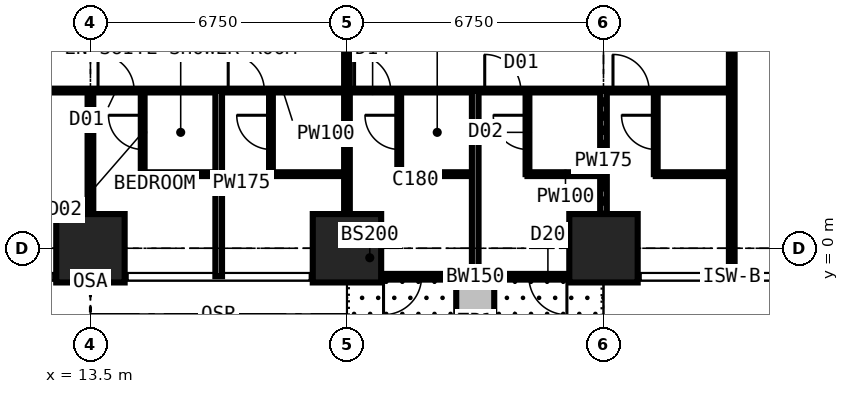
"""IFC4 building model, lengths in metres.
Left out: names, types, materials, properties, quantities, classifications, styles, units other than length and angle.
Written with IfcOpenShell. Run it as: python <this file> out.ifc"""

import sys

from ifc_helpers import new_model, si_unit, direction, frame, frame_2d, origin, origin_2d, place, context, subcontext, project, spatial, rectangle, extrude, element, fill, save


model = new_model("IFC4")
c1 = context("Model", 3, precision=1e-05, world=origin(), true_north=direction((0.0, 1.0)))
c2 = subcontext(c1, "Body", "Model", "MODEL_VIEW")
j1 = project(units=[si_unit("LENGTHUNIT", "METRE"), si_unit("PLANEANGLEUNIT", "RADIAN")], contexts=[c1])
p1 = place(None, origin())
s1 = spatial("IfcSite", under=j1, at=p1, CompositionType="ELEMENT")
p2 = place(p1, origin())
s2 = spatial("IfcBuilding", under=s1, at=p2, CompositionType="ELEMENT")
p3 = place(p2, frame((0.0, 0.0, 90.9)))
s3 = spatial("IfcBuildingStorey", under=s2, at=p3, CompositionType="ELEMENT", Elevation=90.9)
for number, where, z_axis, x_axis in (
    (1, (13.5, 0.0, 0.0), (0.0, 0.0, 1.0), (1.0, 0.0, 0.0)),
    (2, (20.25, 0.0, 0.0), (0.0, 0.0, 1.0), (1.0, 0.0, 0.0)),
    (3, (27.0, 0.0, 0.0), (0.0, 0.0, 1.0), (1.0, 0.0, 0.0)),
):
    element("IfcColumn", number, at=place(p3, frame(where, z_axis=z_axis, x_axis=x_axis)), inside=s3, PredefinedType="COLUMN", context=c2, shape_type="SweptSolid", body=[
        extrude(rectangle(XDim=1.8, YDim=1.8, at=origin_2d()), origin(), (0.0, 0.0, 1.0), 3.6),
    ])
p4 = place(p3, frame((27.0, -0.75, 0.0), z_axis=(0.0, 0.0, 1.0), x_axis=(-1.0, 0.0, 0.0)))
e4 = element("IfcWall", 4, at=p4, inside=s3, PredefinedType="SOLIDWALL", context=c2, shape_type="SweptSolid", body=[
    extrude(rectangle(XDim=6.75, YDim=0.15, at=frame_2d((3.375, 0.0))), origin(), (0.0, 0.0, 1.0), 3.375),
])
p5 = place(p4, frame((0.962, 0.0, 0.0)))
e5 = element("IfcOpeningElement", 5, at=p5, cuts=e4, PredefinedType="OPENING", context=c2, shape_type="SweptSolid", body=[
    extrude(rectangle(XDim=1.0, YDim=2.2, at=frame_2d((0.5, 1.1))), frame((0.0, 0.085, 0.0), z_axis=(0.0, -1.0, 0.0), x_axis=(1.0, 0.0, 0.0)), (0.0, 0.0, 1.0), 0.17),
])
p6 = place(p4, frame((2.025, 0.0, 0.9)))
e6 = element("IfcOpeningElement", 6, at=p6, cuts=e4, PredefinedType="OPENING", context=c2, shape_type="SweptSolid", body=[
    extrude(rectangle(XDim=1.2, YDim=1.8, at=frame_2d((0.6, 0.9))), frame((0.0, 0.085, 0.0), z_axis=(0.0, -1.0, 0.0), x_axis=(1.0, 0.0, 0.0)), (0.0, 0.0, 1.0), 0.17),
])
p7 = place(p4, frame((4.788, 0.0, 0.0)))
e7 = element("IfcOpeningElement", 7, at=p7, cuts=e4, PredefinedType="OPENING", context=c2, shape_type="SweptSolid", body=[
    extrude(rectangle(XDim=1.0, YDim=2.2, at=frame_2d((0.5, 1.1))), frame((0.0, 0.085, 0.0), z_axis=(0.0, -1.0, 0.0), x_axis=(1.0, 0.0, 0.0)), (0.0, 0.0, 1.0), 0.17),
])
p8 = place(p4, frame((3.525, 0.0, 0.9)))
e8 = element("IfcOpeningElement", 8, at=p8, cuts=e4, PredefinedType="OPENING", context=c2, shape_type="SweptSolid", body=[
    extrude(rectangle(XDim=1.2, YDim=1.8, at=frame_2d((0.6, 0.9))), frame((0.0, 0.085, 0.0), z_axis=(0.0, -1.0, 0.0), x_axis=(1.0, 0.0, 0.0)), (0.0, 0.0, 1.0), 0.17),
])
p9 = place(p3, frame((23.625, -0.85, 0.0), z_axis=(0.0, 0.0, 1.0), x_axis=(0.0, -1.0, 0.0)))
e9 = element("IfcWall", 9, at=p9, inside=s3, PredefinedType="USERDEFINED", context=c2, shape_type="SweptSolid", body=[
    extrude(rectangle(XDim=2.2, YDim=1.0, at=frame_2d((1.1, 0.0))), origin(), (0.0, 0.0, 1.0), 0.9),
])
p10 = place(p3, frame((6.75, 4.15, 0.0), z_axis=(0.0, 0.0, 1.0), x_axis=(1.0, 0.0, 0.0)))
e10 = element("IfcWall", 10, at=p10, inside=s3, PredefinedType="PARTITIONING", context=c2, shape_type="SweptSolid", body=[
    extrude(rectangle(XDim=23.625, YDim=0.1, at=frame_2d((11.812, 0.0))), origin(), (0.0, 0.0, 1.0), 3.375),
])
p11 = place(p10, frame((2.85, 0.0, 0.0)))
e11 = element("IfcOpeningElement", 11, at=p11, cuts=e10, PredefinedType="OPENING", context=c2, shape_type="SweptSolid", body=[
    extrude(rectangle(XDim=1.0, YDim=2.2, at=frame_2d((0.5, 1.1))), frame((0.0, 0.06, 0.0), z_axis=(0.0, -1.0, 0.0), x_axis=(1.0, 0.0, 0.0)), (0.0, 0.0, 1.0), 0.12),
])
p12 = place(p10, frame((6.95, 0.0, 0.0)))
e12 = element("IfcOpeningElement", 12, at=p12, cuts=e10, PredefinedType="OPENING", context=c2, shape_type="SweptSolid", body=[
    extrude(rectangle(XDim=0.95, YDim=2.2, at=frame_2d((0.475, 1.1))), frame((0.0, 0.06, 0.0), z_axis=(0.0, -1.0, 0.0), x_axis=(1.0, 0.0, 0.0)), (0.0, 0.0, 1.0), 0.12),
])
p13 = place(p10, frame((10.375, 0.0, 0.0)))
e13 = element("IfcOpeningElement", 13, at=p13, cuts=e10, PredefinedType="OPENING", context=c2, shape_type="SweptSolid", body=[
    extrude(rectangle(XDim=0.95, YDim=2.2, at=frame_2d((0.475, 1.1))), frame((0.0, 0.06, 0.0), z_axis=(0.0, -1.0, 0.0), x_axis=(1.0, 0.0, 0.0)), (0.0, 0.0, 1.0), 0.12),
])
p14 = place(p10, frame((13.7, 0.0, 0.0)))
e14 = element("IfcOpeningElement", 14, at=p14, cuts=e10, PredefinedType="OPENING", context=c2, shape_type="SweptSolid", body=[
    extrude(rectangle(XDim=0.95, YDim=2.2, at=frame_2d((0.475, 1.1))), frame((0.0, 0.06, 0.0), z_axis=(0.0, -1.0, 0.0), x_axis=(1.0, 0.0, 0.0)), (0.0, 0.0, 1.0), 0.12),
])
p15 = place(p10, frame((17.125, 0.0, 0.0)))
e15 = element("IfcOpeningElement", 15, at=p15, cuts=e10, PredefinedType="OPENING", context=c2, shape_type="SweptSolid", body=[
    extrude(rectangle(XDim=0.95, YDim=2.2, at=frame_2d((0.475, 1.1))), frame((0.0, 0.06, 0.0), z_axis=(0.0, -1.0, 0.0), x_axis=(1.0, 0.0, 0.0)), (0.0, 0.0, 1.0), 0.12),
])
p16 = place(p10, frame((20.5, 0.0, 0.0)))
e16 = element("IfcOpeningElement", 16, at=p16, cuts=e10, PredefinedType="OPENING", context=c2, shape_type="SweptSolid", body=[
    extrude(rectangle(XDim=0.95, YDim=2.2, at=frame_2d((0.475, 1.1))), frame((0.0, 0.06, 0.0), z_axis=(0.0, -1.0, 0.0), x_axis=(1.0, 0.0, 0.0)), (0.0, 0.0, 1.0), 0.12),
])
p17 = place(p3, frame((13.5, -0.734, 0.0), z_axis=(0.0, 0.0, 1.0), x_axis=(0.0, 1.0, 0.0)))
e17 = element("IfcWall", 17, at=p17, inside=s3, PredefinedType="PARTITIONING", context=c2, shape_type="SweptSolid", body=[
    extrude(rectangle(XDim=4.884, YDim=0.15, at=frame_2d((2.442, 0.0))), origin(), (0.0, 0.0, 1.0), 2.61),
])
p18 = place(p3, frame((14.875, 1.95, 0.0), z_axis=(0.0, 0.0, 1.0), x_axis=(0.0, 1.0, 0.0)))
e18 = element("IfcWall", 18, at=p18, inside=s3, PredefinedType="PARTITIONING", context=c2, shape_type="SweptSolid", body=[
    extrude(rectangle(XDim=2.2, YDim=0.1, at=frame_2d((1.1, 0.0))), origin(), (0.0, 0.0, 1.0), 3.375),
])
p19 = place(p18, frame((0.65, 0.0, 0.0)))
e19 = element("IfcOpeningElement", 19, at=p19, cuts=e18, PredefinedType="OPENING", context=c2, shape_type="SweptSolid", body=[
    extrude(rectangle(XDim=0.9, YDim=2.2, at=frame_2d((0.45, 1.1))), frame((0.0, 0.06, 0.0), z_axis=(0.0, -1.0, 0.0), x_axis=(1.0, 0.0, 0.0)), (0.0, 0.0, 1.0), 0.12),
])
p20 = place(p3, frame((14.875, 1.95, 0.0), z_axis=(0.0, 0.0, 1.0), x_axis=(1.0, 0.0, 0.0)))
e20 = element("IfcWall", 20, at=p20, inside=s3, PredefinedType="PARTITIONING", context=c2, shape_type="SweptSolid", body=[
    extrude(rectangle(XDim=2.0, YDim=0.1, at=frame_2d((1.0, 0.0))), origin(), (0.0, 0.0, 1.0), 3.375),
])
p21 = place(p3, frame((16.875, -0.734, 0.0), z_axis=(0.0, 0.0, 1.0), x_axis=(0.0, 1.0, 0.0)))
e21 = element("IfcWall", 21, at=p21, inside=s3, PredefinedType="PARTITIONING", context=c2, shape_type="SweptSolid", body=[
    extrude(rectangle(XDim=4.884, YDim=0.175, at=frame_2d((2.442, 0.0))), origin(), (0.0, 0.0, 1.0), 3.375),
])
p22 = place(p3, frame((18.25, 1.95, 0.0), z_axis=(0.0, 0.0, 1.0), x_axis=(0.0, 1.0, 0.0)))
e22 = element("IfcWall", 22, at=p22, inside=s3, PredefinedType="PARTITIONING", context=c2, shape_type="SweptSolid", body=[
    extrude(rectangle(XDim=2.2, YDim=0.1, at=frame_2d((1.1, 0.0))), origin(), (0.0, 0.0, 1.0), 3.375),
])
p23 = place(p22, frame((0.65, 0.0, 0.0)))
e23 = element("IfcOpeningElement", 23, at=p23, cuts=e22, PredefinedType="OPENING", context=c2, shape_type="SweptSolid", body=[
    extrude(rectangle(XDim=0.9, YDim=2.2, at=frame_2d((0.45, 1.1))), frame((0.0, 0.06, 0.0), z_axis=(0.0, -1.0, 0.0), x_axis=(1.0, 0.0, 0.0)), (0.0, 0.0, 1.0), 0.12),
])
p24 = place(p3, frame((18.25, 1.95, 0.0), z_axis=(0.0, 0.0, 1.0), x_axis=(1.0, 0.0, 0.0)))
e24 = element("IfcWall", 24, at=p24, inside=s3, PredefinedType="PARTITIONING", context=c2, shape_type="SweptSolid", body=[
    extrude(rectangle(XDim=2.0, YDim=0.1, at=frame_2d((1.0, 0.0))), origin(), (0.0, 0.0, 1.0), 3.375),
])
p25 = place(p3, frame((20.25, -0.734, 0.0), z_axis=(0.0, 0.0, 1.0), x_axis=(0.0, 1.0, 0.0)))
e25 = element("IfcWall", 25, at=p25, inside=s3, PredefinedType="PARTITIONING", context=c2, shape_type="SweptSolid", body=[
    extrude(rectangle(XDim=12.034, YDim=0.15, at=frame_2d((6.017, 0.0))), origin(), (0.0, 0.0, 1.0), 2.61),
])
p26 = place(p3, frame((21.625, 1.95, 0.0), z_axis=(0.0, 0.0, 1.0), x_axis=(0.0, 1.0, 0.0)))
e26 = element("IfcWall", 26, at=p26, inside=s3, PredefinedType="PARTITIONING", context=c2, shape_type="SweptSolid", body=[
    extrude(rectangle(XDim=2.2, YDim=0.1, at=frame_2d((1.1, 0.0))), origin(), (0.0, 0.0, 1.0), 3.375),
])
p27 = place(p26, frame((0.65, 0.0, 0.0)))
e27 = element("IfcOpeningElement", 27, at=p27, cuts=e26, PredefinedType="OPENING", context=c2, shape_type="SweptSolid", body=[
    extrude(rectangle(XDim=0.9, YDim=2.2, at=frame_2d((0.45, 1.1))), frame((0.0, 0.06, 0.0), z_axis=(0.0, -1.0, 0.0), x_axis=(1.0, 0.0, 0.0)), (0.0, 0.0, 1.0), 0.12),
])
p28 = place(p3, frame((21.625, 1.95, 0.0), z_axis=(0.0, 0.0, 1.0), x_axis=(1.0, 0.0, 0.0)))
e28 = element("IfcWall", 28, at=p28, inside=s3, PredefinedType="PARTITIONING", context=c2, shape_type="SweptSolid", body=[
    extrude(rectangle(XDim=2.0, YDim=0.1, at=frame_2d((1.0, 0.0))), origin(), (0.0, 0.0, 1.0), 3.375),
])
p29 = place(p3, frame((23.625, -0.734, 0.0), z_axis=(0.0, 0.0, 1.0), x_axis=(0.0, 1.0, 0.0)))
e29 = element("IfcWall", 29, at=p29, inside=s3, PredefinedType="PARTITIONING", context=c2, shape_type="SweptSolid", body=[
    extrude(rectangle(XDim=4.884, YDim=0.175, at=frame_2d((2.442, 0.0))), origin(), (0.0, 0.0, 1.0), 3.375),
])
p30 = place(p3, frame((25.0, 1.95, 0.0), z_axis=(0.0, 0.0, 1.0), x_axis=(0.0, 1.0, 0.0)))
e30 = element("IfcWall", 30, at=p30, inside=s3, PredefinedType="PARTITIONING", context=c2, shape_type="SweptSolid", body=[
    extrude(rectangle(XDim=2.2, YDim=0.1, at=frame_2d((1.1, 0.0))), origin(), (0.0, 0.0, 1.0), 3.375),
])
p31 = place(p30, frame((0.65, 0.0, 0.0)))
e31 = element("IfcOpeningElement", 31, at=p31, cuts=e30, PredefinedType="OPENING", context=c2, shape_type="SweptSolid", body=[
    extrude(rectangle(XDim=0.9, YDim=2.2, at=frame_2d((0.45, 1.1))), frame((0.0, 0.06, 0.0), z_axis=(0.0, -1.0, 0.0), x_axis=(1.0, 0.0, 0.0)), (0.0, 0.0, 1.0), 0.12),
])
p32 = place(p3, frame((25.0, 1.95, 0.0), z_axis=(0.0, 0.0, 1.0), x_axis=(1.0, 0.0, 0.0)))
e32 = element("IfcWall", 32, at=p32, inside=s3, PredefinedType="PARTITIONING", context=c2, shape_type="SweptSolid", body=[
    extrude(rectangle(XDim=2.0, YDim=0.1, at=frame_2d((1.0, 0.0))), origin(), (0.0, 0.0, 1.0), 3.375),
])
p33 = place(p3, frame((27.0, -0.734, 0.0), z_axis=(0.0, 0.0, 1.0), x_axis=(0.0, 1.0, 0.0)))
e33 = element("IfcWall", 33, at=p33, inside=s3, PredefinedType="PARTITIONING", context=c2, shape_type="SweptSolid", body=[
    extrude(rectangle(XDim=4.884, YDim=0.175, at=frame_2d((2.442, 0.0))), origin(), (0.0, 0.0, 1.0), 2.877),
])
p34 = place(p3, frame((28.375, 1.95, 0.0), z_axis=(0.0, 0.0, 1.0), x_axis=(0.0, 1.0, 0.0)))
e34 = element("IfcWall", 34, at=p34, inside=s3, PredefinedType="PARTITIONING", context=c2, shape_type="SweptSolid", body=[
    extrude(rectangle(XDim=2.2, YDim=0.1, at=frame_2d((1.1, 0.0))), origin(), (0.0, 0.0, 1.0), 3.375),
])
p35 = place(p34, frame((0.65, 0.0, 0.0)))
e35 = element("IfcOpeningElement", 35, at=p35, cuts=e34, PredefinedType="OPENING", context=c2, shape_type="SweptSolid", body=[
    extrude(rectangle(XDim=0.9, YDim=2.2, at=frame_2d((0.45, 1.1))), frame((0.0, 0.06, 0.0), z_axis=(0.0, -1.0, 0.0), x_axis=(1.0, 0.0, 0.0)), (0.0, 0.0, 1.0), 0.12),
])
p36 = place(p3, frame((28.375, 1.95, 0.0), z_axis=(0.0, 0.0, 1.0), x_axis=(1.0, 0.0, 0.0)))
e36 = element("IfcWall", 36, at=p36, inside=s3, PredefinedType="PARTITIONING", context=c2, shape_type="SweptSolid", body=[
    extrude(rectangle(XDim=2.0, YDim=0.1, at=frame_2d((1.0, 0.0))), origin(), (0.0, 0.0, 1.0), 3.375),
])
p37 = place(p3, frame((30.375, -0.734, 0.0), z_axis=(0.0, 0.0, 1.0), x_axis=(0.0, 1.0, 0.0)))
e37 = element("IfcWall", 37, at=p37, inside=s3, PredefinedType="PARTITIONING", context=c2, shape_type="SweptSolid", body=[
    extrude(rectangle(XDim=12.034, YDim=0.15, at=frame_2d((6.017, 0.0))), origin(), (0.0, 0.0, 1.0), 3.375),
])
p38 = place(p5, origin())
e38 = element("IfcDoor", 38, at=p38, inside=s3, OperationType="SINGLE_SWING_LEFT", PredefinedType="DOOR", context=c2, shape_type="SweptSolid", body=[
    extrude(rectangle(XDim=1.0, YDim=2.2, at=frame_2d((0.5, 1.1))), frame((0.0, 0.025, 0.0), z_axis=(0.0, -1.0, 0.0), x_axis=(1.0, 0.0, 0.0)), (0.0, 0.0, 1.0), 0.05),
])
fill(e5, e38)
p39 = place(p6, origin())
e39 = element("IfcWindow", 39, at=p39, inside=s3, PartitioningType="SINGLE_PANEL", PredefinedType="WINDOW", context=c2, shape_type="SweptSolid", body=[
    extrude(rectangle(XDim=1.2, YDim=1.8, at=frame_2d((0.6, 0.9))), frame((0.0, 0.03, 0.0), z_axis=(0.0, -1.0, 0.0), x_axis=(1.0, 0.0, 0.0)), (0.0, 0.0, 1.0), 0.06),
])
fill(e6, e39)
p40 = place(p7, origin())
e40 = element("IfcDoor", 40, at=p40, inside=s3, OperationType="SINGLE_SWING_RIGHT", PredefinedType="DOOR", context=c2, shape_type="SweptSolid", body=[
    extrude(rectangle(XDim=1.0, YDim=2.2, at=frame_2d((0.5, 1.1))), frame((0.0, 0.025, 0.0), z_axis=(0.0, -1.0, 0.0), x_axis=(1.0, 0.0, 0.0)), (0.0, 0.0, 1.0), 0.05),
])
fill(e7, e40)
p41 = place(p8, origin())
e41 = element("IfcWindow", 41, at=p41, inside=s3, PartitioningType="SINGLE_PANEL", PredefinedType="WINDOW", context=c2, shape_type="SweptSolid", body=[
    extrude(rectangle(XDim=1.2, YDim=1.8, at=frame_2d((0.6, 0.9))), frame((0.0, 0.03, 0.0), z_axis=(0.0, -1.0, 0.0), x_axis=(1.0, 0.0, 0.0)), (0.0, 0.0, 1.0), 0.06),
])
fill(e8, e41)
p42 = place(p12, origin())
e42 = element("IfcDoor", 42, at=p42, inside=s3, OperationType="SINGLE_SWING_LEFT", PredefinedType="DOOR", context=c2, shape_type="SweptSolid", body=[
    extrude(rectangle(XDim=0.95, YDim=2.2, at=frame_2d((0.475, 1.1))), frame((0.0, 0.025, 0.0), z_axis=(0.0, -1.0, 0.0), x_axis=(1.0, 0.0, 0.0)), (0.0, 0.0, 1.0), 0.05),
])
fill(e12, e42)
p43 = place(p19, origin())
e43 = element("IfcDoor", 43, at=p43, inside=s3, OperationType="SINGLE_SWING_RIGHT", PredefinedType="DOOR", context=c2, shape_type="SweptSolid", body=[
    extrude(rectangle(XDim=0.9, YDim=2.2, at=frame_2d((0.45, 1.1))), frame((0.0, 0.025, 0.0), z_axis=(0.0, -1.0, 0.0), x_axis=(1.0, 0.0, 0.0)), (0.0, 0.0, 1.0), 0.05),
])
fill(e19, e43)
p44 = place(p13, origin())
e44 = element("IfcDoor", 44, at=p44, inside=s3, OperationType="SINGLE_SWING_LEFT", PredefinedType="DOOR", context=c2, shape_type="SweptSolid", body=[
    extrude(rectangle(XDim=0.95, YDim=2.2, at=frame_2d((0.475, 1.1))), frame((0.0, 0.025, 0.0), z_axis=(0.0, -1.0, 0.0), x_axis=(1.0, 0.0, 0.0)), (0.0, 0.0, 1.0), 0.05),
])
fill(e13, e44)
p45 = place(p23, origin())
e45 = element("IfcDoor", 45, at=p45, inside=s3, OperationType="SINGLE_SWING_RIGHT", PredefinedType="DOOR", context=c2, shape_type="SweptSolid", body=[
    extrude(rectangle(XDim=0.9, YDim=2.2, at=frame_2d((0.45, 1.1))), frame((0.0, 0.025, 0.0), z_axis=(0.0, -1.0, 0.0), x_axis=(1.0, 0.0, 0.0)), (0.0, 0.0, 1.0), 0.05),
])
fill(e23, e45)
p46 = place(p14, origin())
e46 = element("IfcDoor", 46, at=p46, inside=s3, OperationType="SINGLE_SWING_LEFT", PredefinedType="DOOR", context=c2, shape_type="SweptSolid", body=[
    extrude(rectangle(XDim=0.95, YDim=2.2, at=frame_2d((0.475, 1.1))), frame((0.0, 0.025, 0.0), z_axis=(0.0, -1.0, 0.0), x_axis=(1.0, 0.0, 0.0)), (0.0, 0.0, 1.0), 0.05),
])
fill(e14, e46)
p47 = place(p27, origin())
e47 = element("IfcDoor", 47, at=p47, inside=s3, OperationType="SINGLE_SWING_RIGHT", PredefinedType="DOOR", context=c2, shape_type="SweptSolid", body=[
    extrude(rectangle(XDim=0.9, YDim=2.2, at=frame_2d((0.45, 1.1))), frame((0.0, 0.025, 0.0), z_axis=(0.0, -1.0, 0.0), x_axis=(1.0, 0.0, 0.0)), (0.0, 0.0, 1.0), 0.05),
])
fill(e27, e47)
p48 = place(p15, origin())
e48 = element("IfcDoor", 48, at=p48, inside=s3, OperationType="SINGLE_SWING_LEFT", PredefinedType="DOOR", context=c2, shape_type="SweptSolid", body=[
    extrude(rectangle(XDim=0.95, YDim=2.2, at=frame_2d((0.475, 1.1))), frame((0.0, 0.025, 0.0), z_axis=(0.0, -1.0, 0.0), x_axis=(1.0, 0.0, 0.0)), (0.0, 0.0, 1.0), 0.05),
])
fill(e15, e48)
p49 = place(p31, origin())
e49 = element("IfcDoor", 49, at=p49, inside=s3, OperationType="SINGLE_SWING_RIGHT", PredefinedType="DOOR", context=c2, shape_type="SweptSolid", body=[
    extrude(rectangle(XDim=0.9, YDim=2.2, at=frame_2d((0.45, 1.1))), frame((0.0, 0.025, 0.0), z_axis=(0.0, -1.0, 0.0), x_axis=(1.0, 0.0, 0.0)), (0.0, 0.0, 1.0), 0.05),
])
fill(e31, e49)
p50 = place(p16, origin())
e50 = element("IfcDoor", 50, at=p50, inside=s3, OperationType="SINGLE_SWING_LEFT", PredefinedType="DOOR", context=c2, shape_type="SweptSolid", body=[
    extrude(rectangle(XDim=0.95, YDim=2.2, at=frame_2d((0.475, 1.1))), frame((0.0, 0.025, 0.0), z_axis=(0.0, -1.0, 0.0), x_axis=(1.0, 0.0, 0.0)), (0.0, 0.0, 1.0), 0.05),
])
fill(e16, e50)
p51 = place(p35, origin())
e51 = element("IfcDoor", 51, at=p51, inside=s3, OperationType="SINGLE_SWING_RIGHT", PredefinedType="DOOR", context=c2, shape_type="SweptSolid", body=[
    extrude(rectangle(XDim=0.9, YDim=2.2, at=frame_2d((0.45, 1.1))), frame((0.0, 0.025, 0.0), z_axis=(0.0, -1.0, 0.0), x_axis=(1.0, 0.0, 0.0)), (0.0, 0.0, 1.0), 0.05),
])
fill(e35, e51)
save(model, sys.argv[1])
